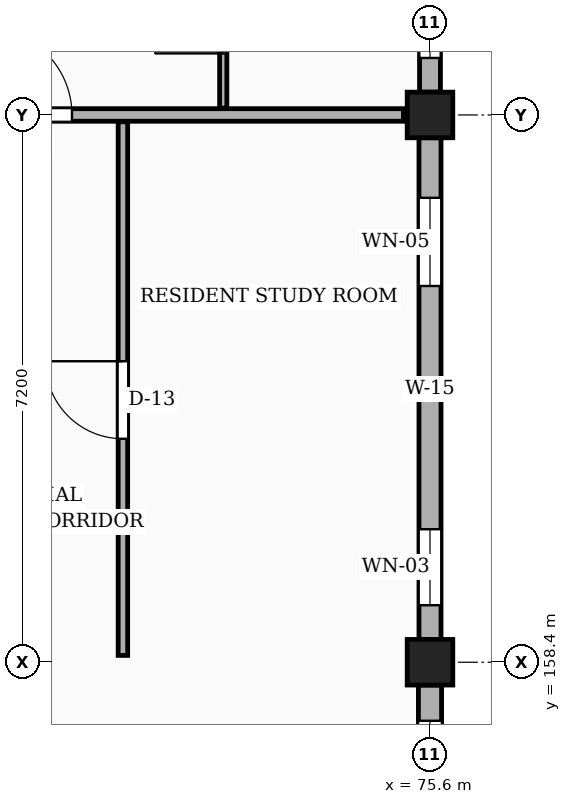
"""IFC4 building model, lengths in metres.
Left out: names, types, materials, properties, quantities, classifications, styles, units other than length and angle.
Written with IfcOpenShell. Run it as: python <this file> out.ifc"""

import sys

from ifc_helpers import new_model, si_unit, direction, frame, frame_2d, origin, origin_2d, place, context, subcontext, project, spatial, rectangle, extrude, element, fill, save


model = new_model("IFC4")
c1 = context("Model", 3, precision=1e-05, world=origin(), true_north=direction((0.0, 1.0)))
c2 = subcontext(c1, "Body", "Model", "MODEL_VIEW")
j1 = project(units=[si_unit("LENGTHUNIT", "METRE"), si_unit("PLANEANGLEUNIT", "RADIAN")], contexts=[c1])
p1 = place(None, origin())
s1 = spatial("IfcSite", under=j1, at=p1, CompositionType="ELEMENT")
p2 = place(p1, origin())
s2 = spatial("IfcBuilding", under=s1, at=p2, CompositionType="ELEMENT")
p3 = place(p2, frame((0.0, 0.0, 4.5)))
s3 = spatial("IfcBuildingStorey", under=s2, at=p3, CompositionType="ELEMENT", Elevation=4.5)
for number, where, z_axis, x_axis in (
    (1, (75.6, 158.4, 0.0), (0.0, 0.0, 1.0), (1.0, 0.0, 0.0)),
    (2, (75.6, 165.6, 0.0), (0.0, 0.0, 1.0), (1.0, 0.0, 0.0)),
):
    element("IfcColumn", number, at=place(p3, frame(where, z_axis=z_axis, x_axis=x_axis)), inside=s3, PredefinedType="COLUMN", context=c2, shape_type="SweptSolid", body=[
        extrude(rectangle(XDim=0.6, YDim=0.6, at=origin_2d()), origin(), (0.0, 0.0, 1.0), 3.15),
    ])
p4 = place(p3, frame((75.6, 151.5, 0.0), z_axis=(0.0, 0.0, 1.0), x_axis=(0.0, 1.0, 0.0)))
e3 = element("IfcWall", 3, at=p4, inside=s3, PredefinedType="SOLIDWALL", context=c2, shape_type="SweptSolid", body=[
    extrude(rectangle(XDim=6.6, YDim=0.305, at=frame_2d((3.3, 0.0))), origin(), (0.0, 0.0, 1.0), 2.455),
])
p5 = place(p4, frame((2.11, 0.0, 0.78)))
e4 = element("IfcOpeningElement", 4, at=p5, cuts=e3, PredefinedType="OPENING", context=c2, shape_type="SweptSolid", body=[
    extrude(rectangle(XDim=0.85, YDim=1.15, at=frame_2d((0.425, 0.575))), frame((0.0, 0.163, 0.0), z_axis=(0.0, -1.0, 0.0), x_axis=(1.0, 0.0, 0.0)), (0.0, 0.0, 1.0), 0.325),
])
p6 = place(p4, frame((5.13, 0.0, 0.78)))
e5 = element("IfcOpeningElement", 5, at=p6, cuts=e3, PredefinedType="OPENING", context=c2, shape_type="SweptSolid", body=[
    extrude(rectangle(XDim=1.0, YDim=1.15, at=frame_2d((0.5, 0.575))), frame((0.0, 0.163, 0.0), z_axis=(0.0, -1.0, 0.0), x_axis=(1.0, 0.0, 0.0)), (0.0, 0.0, 1.0), 0.325),
])
p7 = place(p3, frame((75.6, 158.7, 0.0), z_axis=(0.0, 0.0, 1.0), x_axis=(0.0, 1.0, 0.0)))
e6 = element("IfcWall", 6, at=p7, inside=s3, PredefinedType="SOLIDWALL", context=c2, shape_type="SweptSolid", body=[
    extrude(rectangle(XDim=6.6, YDim=0.29, at=frame_2d((3.3, 0.0))), origin(), (0.0, 0.0, 1.0), 2.455),
])
p8 = place(p7, frame((0.45, 0.0, 0.78)))
e7 = element("IfcOpeningElement", 7, at=p8, cuts=e6, PredefinedType="OPENING", context=c2, shape_type="SweptSolid", body=[
    extrude(rectangle(XDim=1.0, YDim=1.15, at=frame_2d((0.5, 0.575))), frame((0.0, 0.155, 0.0), z_axis=(0.0, -1.0, 0.0), x_axis=(1.0, 0.0, 0.0)), (0.0, 0.0, 1.0), 0.31),
])
p9 = place(p7, frame((4.65, 0.0, 0.78)))
e8 = element("IfcOpeningElement", 8, at=p9, cuts=e6, PredefinedType="OPENING", context=c2, shape_type="SweptSolid", body=[
    extrude(rectangle(XDim=1.16, YDim=1.15, at=frame_2d((0.58, 0.575))), frame((0.0, 0.155, 0.0), z_axis=(0.0, -1.0, 0.0), x_axis=(1.0, 0.0, 0.0)), (0.0, 0.0, 1.0), 0.31),
])
p10 = place(p3, frame((75.6, 165.9, 0.0), z_axis=(0.0, 0.0, 1.0), x_axis=(0.0, 1.0, 0.0)))
e9 = element("IfcWall", 9, at=p10, inside=s3, PredefinedType="SOLIDWALL", context=c2, shape_type="SweptSolid", body=[
    extrude(rectangle(XDim=6.6, YDim=0.275, at=frame_2d((3.3, 0.0))), origin(), (0.0, 0.0, 1.0), 2.455),
])
p11 = place(p10, frame((0.45, 0.0, 0.78)))
e10 = element("IfcOpeningElement", 10, at=p11, cuts=e9, PredefinedType="OPENING", context=c2, shape_type="SweptSolid", body=[
    extrude(rectangle(XDim=1.16, YDim=1.15, at=frame_2d((0.58, 0.575))), frame((0.0, 0.147, 0.0), z_axis=(0.0, -1.0, 0.0), x_axis=(1.0, 0.0, 0.0)), (0.0, 0.0, 1.0), 0.295),
])
p12 = place(p10, frame((4.65, 0.0, 0.78)))
e11 = element("IfcOpeningElement", 11, at=p12, cuts=e9, PredefinedType="OPENING", context=c2, shape_type="SweptSolid", body=[
    extrude(rectangle(XDim=1.32, YDim=1.15, at=frame_2d((0.66, 0.575))), frame((0.0, 0.147, 0.0), z_axis=(0.0, -1.0, 0.0), x_axis=(1.0, 0.0, 0.0)), (0.0, 0.0, 1.0), 0.295),
])
p13 = place(p3, frame((68.75, 165.6, 0.0), z_axis=(0.0, 0.0, 1.0), x_axis=(1.0, 0.0, 0.0)))
e12 = element("IfcWall", 12, at=p13, inside=s3, PredefinedType="PARTITIONING", context=c2, shape_type="SweptSolid", body=[
    extrude(rectangle(XDim=6.5, YDim=0.165, at=frame_2d((3.25, 0.0))), origin(), (0.0, 0.0, 1.0), 2.185),
])
p14 = place(p13, frame((1.0, 0.0, 0.0)))
e13 = element("IfcOpeningElement", 13, at=p14, cuts=e12, PredefinedType="OPENING", context=c2, shape_type="SweptSolid", body=[
    extrude(rectangle(XDim=1.14, YDim=2.18, at=frame_2d((0.57, 1.09))), frame((0.0, 0.093, 0.0), z_axis=(0.0, -1.0, 0.0), x_axis=(1.0, 0.0, 0.0)), (0.0, 0.0, 1.0), 0.185),
])
p15 = place(p3, frame((71.56, 158.49, 0.0), z_axis=(0.0, 0.0, 1.0), x_axis=(0.0, 1.0, 0.0)))
e14 = element("IfcWall", 14, at=p15, inside=s3, PredefinedType="PARTITIONING", context=c2, shape_type="SweptSolid", body=[
    extrude(rectangle(XDim=7.02, YDim=0.125, at=frame_2d((3.51, 0.0))), origin(), (0.0, 0.0, 1.0), 2.32),
])
p16 = place(p15, frame((2.85, 0.0, 0.0)))
e15 = element("IfcOpeningElement", 15, at=p16, cuts=e14, PredefinedType="OPENING", context=c2, shape_type="SweptSolid", body=[
    extrude(rectangle(XDim=1.02, YDim=2.15, at=frame_2d((0.51, 1.075))), frame((0.0, 0.073, 0.0), z_axis=(0.0, -1.0, 0.0), x_axis=(1.0, 0.0, 0.0)), (0.0, 0.0, 1.0), 0.145),
])
p17 = place(p3, frame((72.88, 165.69, 0.0), z_axis=(0.0, 0.0, 1.0), x_axis=(0.0, 1.0, 0.0)))
e16 = element("IfcWall", 16, at=p17, inside=s3, PredefinedType="PARTITIONING", context=c2, shape_type="SweptSolid", body=[
    extrude(rectangle(XDim=2.34, YDim=0.095, at=frame_2d((1.17, 0.0))), origin(), (0.0, 0.0, 1.0), 2.32),
])
p18 = place(p17, frame((0.72, 0.0, 0.0)))
e17 = element("IfcOpeningElement", 17, at=p18, cuts=e16, PredefinedType="OPENING", context=c2, shape_type="SweptSolid", body=[
    extrude(rectangle(XDim=0.9, YDim=2.05, at=frame_2d((0.45, 1.025))), frame((0.0, 0.058, 0.0), z_axis=(0.0, -1.0, 0.0), x_axis=(1.0, 0.0, 0.0)), (0.0, 0.0, 1.0), 0.115),
])
p19 = place(p6, origin())
e18 = element("IfcWindow", 18, at=p19, inside=s3, PartitioningType="SINGLE_PANEL", PredefinedType="WINDOW", context=c2, shape_type="SweptSolid", body=[
    extrude(rectangle(XDim=1.0, YDim=1.15, at=frame_2d((0.5, 0.575))), frame((0.0, 0.03, 0.0), z_axis=(0.0, -1.0, 0.0), x_axis=(1.0, 0.0, 0.0)), (0.0, 0.0, 1.0), 0.06),
])
fill(e5, e18)
p20 = place(p8, origin())
e19 = element("IfcWindow", 19, at=p20, inside=s3, PartitioningType="SINGLE_PANEL", PredefinedType="WINDOW", context=c2, shape_type="SweptSolid", body=[
    extrude(rectangle(XDim=1.0, YDim=1.15, at=frame_2d((0.5, 0.575))), frame((0.0, 0.03, 0.0), z_axis=(0.0, -1.0, 0.0), x_axis=(1.0, 0.0, 0.0)), (0.0, 0.0, 1.0), 0.06),
])
fill(e7, e19)
p21 = place(p9, origin())
e20 = element("IfcWindow", 20, at=p21, inside=s3, PartitioningType="SINGLE_PANEL", PredefinedType="WINDOW", context=c2, shape_type="SweptSolid", body=[
    extrude(rectangle(XDim=1.16, YDim=1.15, at=frame_2d((0.58, 0.575))), frame((0.0, 0.03, 0.0), z_axis=(0.0, -1.0, 0.0), x_axis=(1.0, 0.0, 0.0)), (0.0, 0.0, 1.0), 0.06),
])
fill(e8, e20)
p22 = place(p11, origin())
e21 = element("IfcWindow", 21, at=p22, inside=s3, PartitioningType="SINGLE_PANEL", PredefinedType="WINDOW", context=c2, shape_type="SweptSolid", body=[
    extrude(rectangle(XDim=1.16, YDim=1.15, at=frame_2d((0.58, 0.575))), frame((0.0, 0.03, 0.0), z_axis=(0.0, -1.0, 0.0), x_axis=(1.0, 0.0, 0.0)), (0.0, 0.0, 1.0), 0.06),
])
fill(e10, e21)
p23 = place(p14, origin())
e22 = element("IfcDoor", 22, at=p23, inside=s3, OperationType="SINGLE_SWING_LEFT", PredefinedType="DOOR", context=c2, shape_type="SweptSolid", body=[
    extrude(rectangle(XDim=1.14, YDim=2.18, at=frame_2d((0.57, 1.09))), frame((0.0, 0.025, 0.0), z_axis=(0.0, -1.0, 0.0), x_axis=(1.0, 0.0, 0.0)), (0.0, 0.0, 1.0), 0.05),
])
fill(e13, e22)
p24 = place(p16, origin())
e23 = element("IfcDoor", 23, at=p24, inside=s3, OperationType="SINGLE_SWING_RIGHT", PredefinedType="DOOR", context=c2, shape_type="SweptSolid", body=[
    extrude(rectangle(XDim=1.02, YDim=2.15, at=frame_2d((0.51, 1.075))), frame((0.0, 0.025, 0.0), z_axis=(0.0, -1.0, 0.0), x_axis=(1.0, 0.0, 0.0)), (0.0, 0.0, 1.0), 0.05),
])
fill(e15, e23)
p25 = place(p18, origin())
e24 = element("IfcDoor", 24, at=p25, inside=s3, OperationType="SINGLE_SWING_LEFT", PredefinedType="DOOR", context=c2, shape_type="SweptSolid", body=[
    extrude(rectangle(XDim=0.9, YDim=2.05, at=frame_2d((0.45, 1.025))), frame((0.0, 0.025, 0.0), z_axis=(0.0, -1.0, 0.0), x_axis=(1.0, 0.0, 0.0)), (0.0, 0.0, 1.0), 0.05),
])
fill(e17, e24)
save(model, sys.argv[1])
